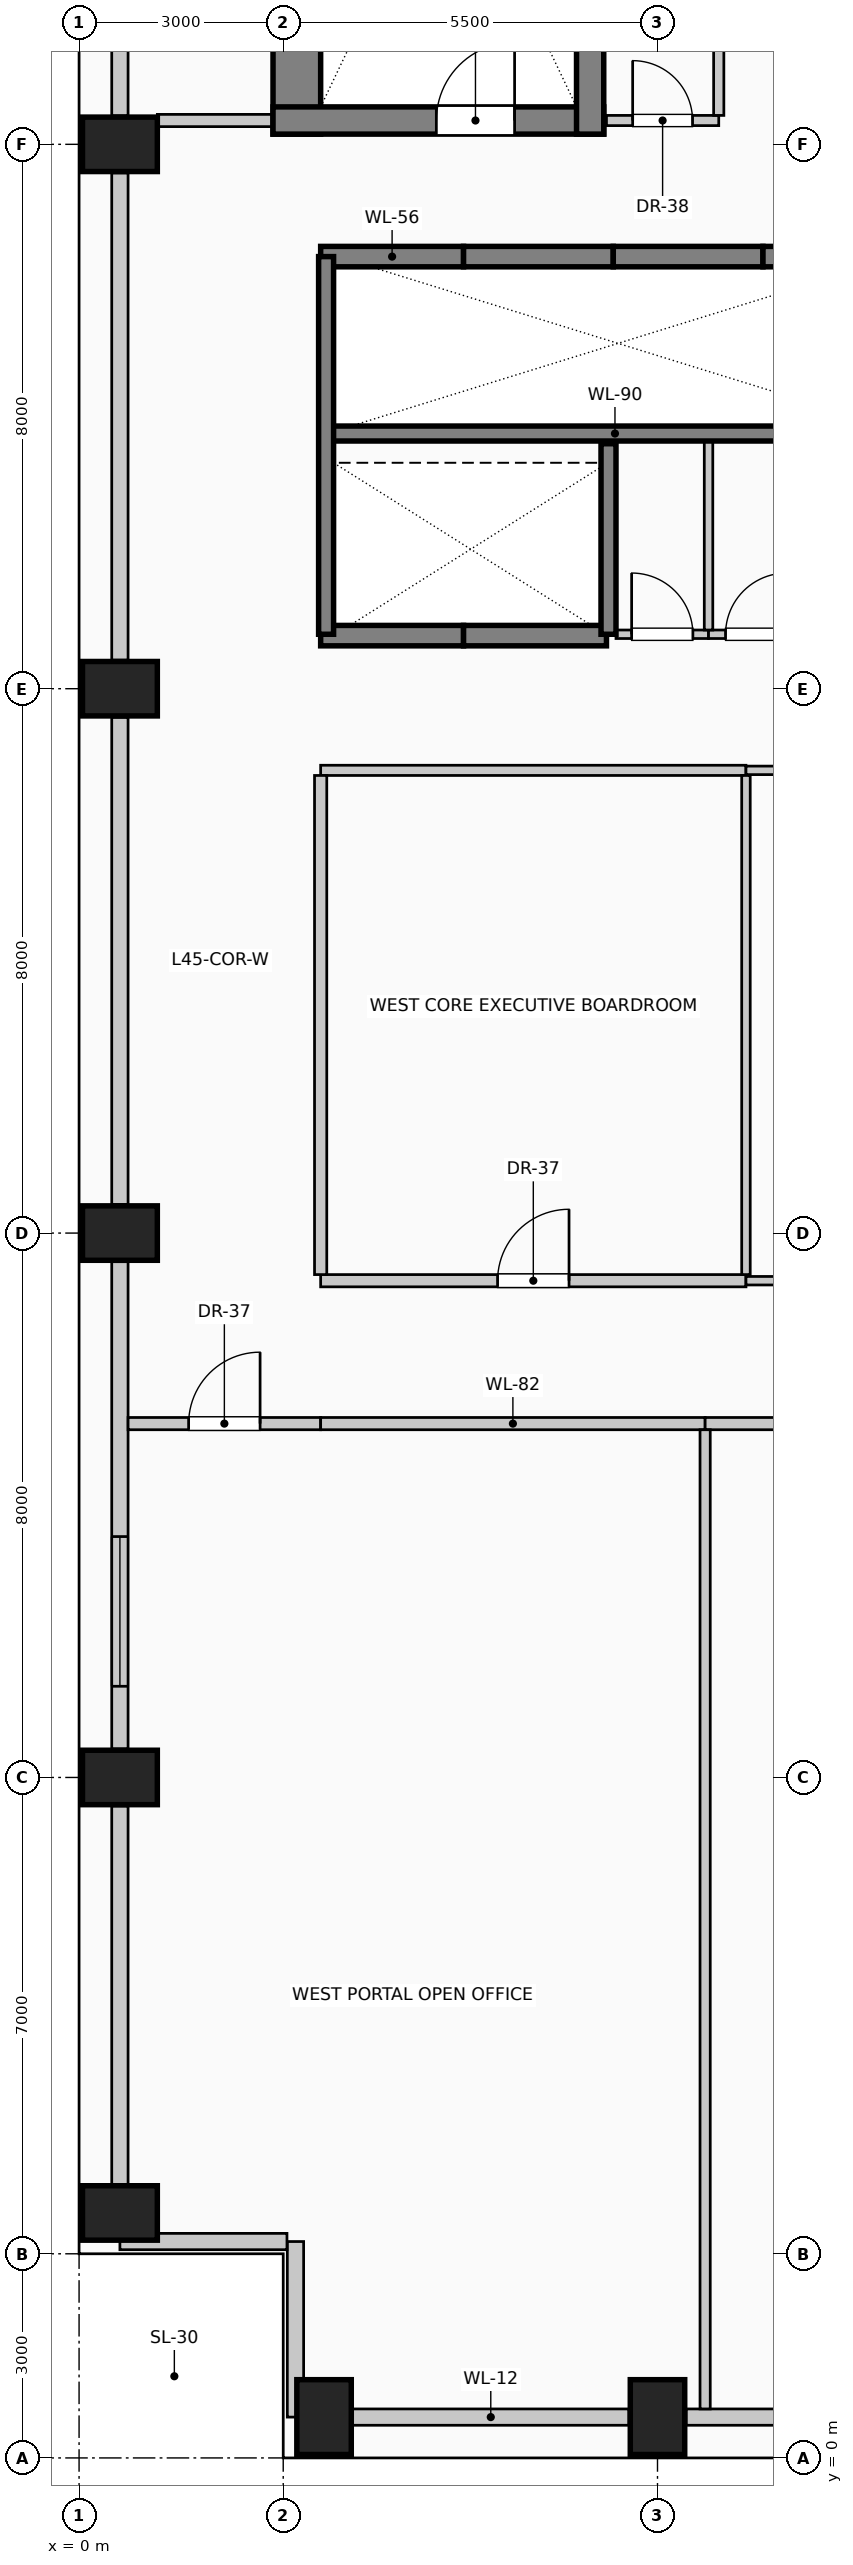
"""IFC4 building model, lengths in metres.
Left out: names, types, materials, properties, quantities, classifications, styles, units other than length and angle.
Written with IfcOpenShell. Run it as: python <this file> out.ifc"""

import sys

from ifc_helpers import new_model, si_unit, direction, frame, frame_2d, origin, origin_2d, place, context, subcontext, project, spatial, rectangle, extrude, element, fill, save


model = new_model("IFC4")
c1 = context("Model", 3, precision=1e-05, world=origin(), true_north=direction((0.0, 1.0)))
c2 = subcontext(c1, "Body", "Model", "MODEL_VIEW")
j1 = project(units=[si_unit("LENGTHUNIT", "METRE"), si_unit("PLANEANGLEUNIT", "RADIAN")], contexts=[c1])
p1 = place(None, origin())
s1 = spatial("IfcSite", under=j1, at=p1, CompositionType="ELEMENT")
p2 = place(p1, origin())
s2 = spatial("IfcBuilding", under=s1, at=p2, CompositionType="ELEMENT")
p3 = place(p2, frame((0.0, 0.0, 186.6)))
s3 = spatial("IfcBuildingStorey", under=s2, at=p3, CompositionType="ELEMENT", Elevation=186.6)
p4 = place(p3, frame((3.2, 34.15, 0.0), z_axis=(0.0, 0.0, 1.0), x_axis=(0.0, 1.0, 0.0)))
e1 = element("IfcWall", 1, at=p4, inside=s3, PredefinedType="SHEAR", context=c2, shape_type="SweptSolid", body=[
    extrude(rectangle(XDim=8.98, YDim=0.7, at=frame_2d((4.49, 0.0))), origin(), (0.0, 0.0, 1.0), 4.0),
])
p5 = place(p3, frame((2.85, 34.35, 0.0), z_axis=(0.0, 0.0, 1.0), x_axis=(1.0, 0.0, 0.0)))
e2 = element("IfcWall", 2, at=p5, inside=s3, PredefinedType="SHEAR", context=c2, shape_type="SweptSolid", body=[
    extrude(rectangle(XDim=4.86, YDim=0.4, at=frame_2d((2.43, 0.0))), origin(), (0.0, 0.0, 1.0), 4.0),
])
p6 = place(p5, frame((2.4, 0.0, 0.0)))
e3 = element("IfcOpeningElement", 3, at=p6, cuts=e2, PredefinedType="OPENING", context=c2, shape_type="SweptSolid", body=[
    extrude(rectangle(XDim=1.15, YDim=2.2, at=frame_2d((0.575, 1.1))), frame((0.0, 0.21, 0.0), z_axis=(0.0, -1.0, 0.0), x_axis=(1.0, 0.0, 0.0)), (0.0, 0.0, 1.0), 0.42),
])
p7 = place(p3, frame((7.51, 34.15, 0.0), z_axis=(0.0, 0.0, 1.0), x_axis=(0.0, 1.0, 0.0)))
e4 = element("IfcWall", 4, at=p7, inside=s3, PredefinedType="SHEAR", context=c2, shape_type="SweptSolid", body=[
    extrude(rectangle(XDim=8.98, YDim=0.4, at=frame_2d((4.49, 0.0))), origin(), (0.0, 0.0, 1.0), 4.0),
])
for number, where, z_axis, x_axis in (
    (5, (3.6, 0.6, 0.0), (0.0, 0.0, 1.0), (1.0, 0.0, 0.0)),
    (6, (8.5, 0.6, 0.0), (0.0, 0.0, 1.0), (1.0, 0.0, 0.0)),
    (7, (0.6, 3.6, 0.0), (0.0, 0.0, 1.0), (0.0, 1.0, 0.0)),
    (8, (0.6, 10.0, 0.0), (0.0, 0.0, 1.0), (0.0, 1.0, 0.0)),
    (9, (0.6, 18.0, 0.0), (0.0, 0.0, 1.0), (0.0, 1.0, 0.0)),
    (10, (0.6, 26.0, 0.0), (0.0, 0.0, 1.0), (0.0, 1.0, 0.0)),
    (11, (0.6, 34.0, 0.0), (0.0, 0.0, 1.0), (0.0, 1.0, 0.0)),
):
    element("IfcColumn", number, at=place(p3, frame(where, z_axis=z_axis, x_axis=x_axis)), inside=s3, PredefinedType="COLUMN", context=c2, shape_type="SweptSolid", body=[
        extrude(rectangle(XDim=0.8, YDim=1.1, at=origin_2d()), origin(), (0.0, 0.0, 1.0), 4.0),
    ])
p8 = place(p3, frame((8.08, 0.6, 0.0), z_axis=(0.0, 0.0, 1.0), x_axis=(-1.0, 0.0, 0.0)))
e12 = element("IfcWall", 12, at=p8, inside=s3, PredefinedType="SOLIDWALL", context=c2, shape_type="SweptSolid", body=[
    extrude(rectangle(XDim=4.06, YDim=0.24, at=frame_2d((2.03, 0.0))), origin(), (0.0, 0.0, 1.0), 3.0),
])
p9 = place(p3, frame((13.58, 0.6, 0.0), z_axis=(0.0, 0.0, 1.0), x_axis=(-1.0, 0.0, 0.0)))
e13 = element("IfcWall", 13, at=p9, inside=s3, PredefinedType="SOLIDWALL", context=c2, shape_type="SweptSolid", body=[
    extrude(rectangle(XDim=4.66, YDim=0.24, at=frame_2d((2.33, 0.0))), origin(), (0.0, 0.0, 1.0), 3.0),
])
p10 = place(p3, frame((0.6, 4.02, 0.0), z_axis=(0.0, 0.0, 1.0), x_axis=(0.0, 1.0, 0.0)))
e14 = element("IfcWall", 14, at=p10, inside=s3, PredefinedType="SOLIDWALL", context=c2, shape_type="SweptSolid", body=[
    extrude(rectangle(XDim=5.56, YDim=0.24, at=frame_2d((2.78, 0.0))), origin(), (0.0, 0.0, 1.0), 3.0),
])
p11 = place(p3, frame((0.6, 10.42, 0.0), z_axis=(0.0, 0.0, 1.0), x_axis=(0.0, 1.0, 0.0)))
e15 = element("IfcWall", 15, at=p11, inside=s3, PredefinedType="SOLIDWALL", context=c2, shape_type="SweptSolid", body=[
    extrude(rectangle(XDim=7.16, YDim=0.24, at=frame_2d((3.58, 0.0))), origin(), (0.0, 0.0, 1.0), 3.0),
])
p12 = place(p11, frame((0.92, 0.0, 0.42)))
e16 = element("IfcOpeningElement", 16, at=p12, cuts=e15, PredefinedType="OPENING", context=c2, shape_type="SweptSolid", body=[
    extrude(rectangle(XDim=2.2, YDim=1.95, at=frame_2d((1.1, 0.975))), frame((0.0, 0.13, 0.0), z_axis=(0.0, -1.0, 0.0), x_axis=(1.0, 0.0, 0.0)), (0.0, 0.0, 1.0), 0.26),
])
for number, where, z_axis, x_axis in (
    (17, (0.6, 18.42, 0.0), (0.0, 0.0, 1.0), (0.0, 1.0, 0.0)),
    (18, (0.6, 26.42, 0.0), (0.0, 0.0, 1.0), (0.0, 1.0, 0.0)),
):
    element("IfcWall", number, at=place(p3, frame(where, z_axis=z_axis, x_axis=x_axis)), inside=s3, PredefinedType="SOLIDWALL", context=c2, shape_type="SweptSolid", body=[
        extrude(rectangle(XDim=7.16, YDim=0.24, at=frame_2d((3.58, 0.0))), origin(), (0.0, 0.0, 1.0), 3.0),
    ])
p13 = place(p3, frame((0.6, 34.42, 0.0), z_axis=(0.0, 0.0, 1.0), x_axis=(0.0, 1.0, 0.0)))
e19 = element("IfcWall", 19, at=p13, inside=s3, PredefinedType="SOLIDWALL", context=c2, shape_type="SweptSolid", body=[
    extrude(rectangle(XDim=7.56, YDim=0.24, at=frame_2d((3.78, 0.0))), origin(), (0.0, 0.0, 1.0), 3.0),
])
p14 = place(p3, frame((3.18, 0.6, 0.0), z_axis=(0.0, 0.0, 1.0), x_axis=(0.0, 1.0, 0.0)))
e20 = element("IfcWall", 20, at=p14, inside=s3, PredefinedType="SOLIDWALL", context=c2, shape_type="SweptSolid", body=[
    extrude(rectangle(XDim=2.58, YDim=0.24, at=frame_2d((1.29, 0.0))), origin(), (0.0, 0.0, 1.0), 3.75),
])
p15 = place(p3, frame((3.055, 3.18, 0.0), z_axis=(0.0, 0.0, 1.0), x_axis=(-1.0, 0.0, 0.0)))
e21 = element("IfcWall", 21, at=p15, inside=s3, PredefinedType="SOLIDWALL", context=c2, shape_type="SweptSolid", body=[
    extrude(rectangle(XDim=2.455, YDim=0.24, at=frame_2d((1.228, 0.0))), origin(), (0.0, 0.0, 1.0), 3.75),
])
p16 = place(p3, frame((3.55, 32.35, 0.0), z_axis=(0.0, 0.0, 1.0), x_axis=(1.0, 0.0, 0.0)))
e22 = element("IfcWall", 22, at=p16, inside=s3, PredefinedType="SOLIDWALL", context=c2, shape_type="SweptSolid", body=[
    extrude(rectangle(XDim=2.1, YDim=0.3, at=frame_2d((1.05, 0.0))), origin(), (0.0, 0.0, 1.0), 4.0),
])
p17 = place(p3, frame((5.65, 32.35, 0.0), z_axis=(0.0, 0.0, 1.0), x_axis=(1.0, 0.0, 0.0)))
e23 = element("IfcWall", 23, at=p17, inside=s3, PredefinedType="SOLIDWALL", context=c2, shape_type="SweptSolid", body=[
    extrude(rectangle(XDim=2.2, YDim=0.3, at=frame_2d((1.1, 0.0))), origin(), (0.0, 0.0, 1.0), 4.0),
])
p18 = place(p3, frame((7.85, 32.35, 0.0), z_axis=(0.0, 0.0, 1.0), x_axis=(1.0, 0.0, 0.0)))
e24 = element("IfcWall", 24, at=p18, inside=s3, PredefinedType="SOLIDWALL", context=c2, shape_type="SweptSolid", body=[
    extrude(rectangle(XDim=2.2, YDim=0.3, at=frame_2d((1.1, 0.0))), origin(), (0.0, 0.0, 1.0), 4.0),
])
p19 = place(p3, frame((10.05, 32.35, 0.0), z_axis=(0.0, 0.0, 1.0), x_axis=(1.0, 0.0, 0.0)))
e25 = element("IfcWall", 25, at=p19, inside=s3, PredefinedType="SOLIDWALL", context=c2, shape_type="SweptSolid", body=[
    extrude(rectangle(XDim=2.15, YDim=0.3, at=frame_2d((1.075, 0.0))), origin(), (0.0, 0.0, 1.0), 4.0),
])
p20 = place(p3, frame((5.65, 26.78, 0.0), z_axis=(0.0, 0.0, 1.0), x_axis=(-1.0, 0.0, 0.0)))
e26 = element("IfcWall", 26, at=p20, inside=s3, PredefinedType="SOLIDWALL", context=c2, shape_type="SweptSolid", body=[
    extrude(rectangle(XDim=2.1, YDim=0.3, at=frame_2d((1.05, 0.0))), origin(), (0.0, 0.0, 1.0), 4.0),
])
p21 = place(p3, frame((7.75, 26.78, 0.0), z_axis=(0.0, 0.0, 1.0), x_axis=(-1.0, 0.0, 0.0)))
e27 = element("IfcWall", 27, at=p21, inside=s3, PredefinedType="SOLIDWALL", context=c2, shape_type="SweptSolid", body=[
    extrude(rectangle(XDim=2.1, YDim=0.3, at=frame_2d((1.05, 0.0))), origin(), (0.0, 0.0, 1.0), 4.0),
])
p22 = place(p3, frame((3.55, 29.75, 0.0), z_axis=(0.0, 0.0, 1.0), x_axis=(1.0, 0.0, 0.0)))
e28 = element("IfcWall", 28, at=p22, inside=s3, PredefinedType="SOLIDWALL", context=c2, shape_type="SweptSolid", body=[
    extrude(rectangle(XDim=8.65, YDim=0.22, at=frame_2d((4.325, 0.0))), origin(), (0.0, 0.0, 1.0), 4.0),
])
p23 = place(p3, frame((3.63, 26.8, 0.0), z_axis=(0.0, 0.0, 1.0), x_axis=(0.0, 1.0, 0.0)))
e29 = element("IfcWall", 29, at=p23, inside=s3, PredefinedType="SOLIDWALL", context=c2, shape_type="SweptSolid", body=[
    extrude(rectangle(XDim=5.55, YDim=0.22, at=frame_2d((2.775, 0.0))), origin(), (0.0, 0.0, 1.0), 4.0),
])
p24 = place(p3, frame((7.78, 26.8, 0.0), z_axis=(0.0, 0.0, 1.0), x_axis=(0.0, 1.0, 0.0)))
e30 = element("IfcWall", 30, at=p24, inside=s3, PredefinedType="SOLIDWALL", context=c2, shape_type="SweptSolid", body=[
    extrude(rectangle(XDim=2.8, YDim=0.22, at=frame_2d((1.4, 0.0))), origin(), (0.0, 0.0, 1.0), 4.0),
])
p25 = place(p3, frame((0.72, 15.2, 0.0), z_axis=(0.0, 0.0, 1.0), x_axis=(1.0, 0.0, 0.0)))
e31 = element("IfcWall", 31, at=p25, inside=s3, PredefinedType="PARTITIONING", context=c2, shape_type="SweptSolid", body=[
    extrude(rectangle(XDim=2.83, YDim=0.18, at=frame_2d((1.415, 0.0))), origin(), (0.0, 0.0, 1.0), 3.75),
])
p26 = place(p25, frame((0.89, 0.0, 0.0)))
e32 = element("IfcOpeningElement", 32, at=p26, cuts=e31, PredefinedType="OPENING", context=c2, shape_type="SweptSolid", body=[
    extrude(rectangle(XDim=1.05, YDim=2.15, at=frame_2d((0.525, 1.075))), frame((0.0, 0.1, 0.0), z_axis=(0.0, -1.0, 0.0), x_axis=(1.0, 0.0, 0.0)), (0.0, 0.0, 1.0), 0.2),
])
p27 = place(p3, frame((3.55, 15.2, 0.0), z_axis=(0.0, 0.0, 1.0), x_axis=(1.0, 0.0, 0.0)))
e33 = element("IfcWall", 33, at=p27, inside=s3, PredefinedType="PARTITIONING", context=c2, shape_type="SweptSolid", body=[
    extrude(rectangle(XDim=5.65, YDim=0.18, at=frame_2d((2.825, 0.0))), origin(), (0.0, 0.0, 1.0), 3.75),
])
p28 = place(p3, frame((9.2, 15.2, 0.0), z_axis=(0.0, 0.0, 1.0), x_axis=(1.0, 0.0, 0.0)))
e34 = element("IfcWall", 34, at=p28, inside=s3, PredefinedType="PARTITIONING", context=c2, shape_type="SweptSolid", body=[
    extrude(rectangle(XDim=14.68, YDim=0.18, at=frame_2d((7.34, 0.0))), origin(), (0.0, 0.0, 1.0), 3.75),
])
p29 = place(p28, frame((6.815, 0.0, 0.0)))
e35 = element("IfcOpeningElement", 35, at=p29, cuts=e34, PredefinedType="OPENING", context=c2, shape_type="SweptSolid", body=[
    extrude(rectangle(XDim=1.05, YDim=2.15, at=frame_2d((0.525, 1.075))), frame((0.0, 0.1, 0.0), z_axis=(0.0, -1.0, 0.0), x_axis=(1.0, 0.0, 0.0)), (0.0, 0.0, 1.0), 0.2),
])
p30 = place(p3, frame((3.55, 17.3, 0.0), z_axis=(0.0, 0.0, 1.0), x_axis=(1.0, 0.0, 0.0)))
e36 = element("IfcWall", 36, at=p30, inside=s3, PredefinedType="PARTITIONING", context=c2, shape_type="SweptSolid", body=[
    extrude(rectangle(XDim=6.25, YDim=0.18, at=frame_2d((3.125, 0.0))), origin(), (0.0, 0.0, 1.0), 3.75),
])
p31 = place(p30, frame((2.6, 0.0, 0.0)))
e37 = element("IfcOpeningElement", 37, at=p31, cuts=e36, PredefinedType="OPENING", context=c2, shape_type="SweptSolid", body=[
    extrude(rectangle(XDim=1.05, YDim=2.15, at=frame_2d((0.525, 1.075))), frame((0.0, 0.1, 0.0), z_axis=(0.0, -1.0, 0.0), x_axis=(1.0, 0.0, 0.0)), (0.0, 0.0, 1.0), 0.2),
])
p32 = place(p3, frame((9.8, 17.3, 0.0), z_axis=(0.0, 0.0, 1.0), x_axis=(1.0, 0.0, 0.0)))
e38 = element("IfcWall", 38, at=p32, inside=s3, PredefinedType="PARTITIONING", context=c2, shape_type="SweptSolid", body=[
    extrude(rectangle(XDim=6.05, YDim=0.125, at=frame_2d((3.025, 0.0))), origin(), (0.0, 0.0, 1.0), 3.75),
])
p33 = place(p32, frame((2.575, 0.0, 0.0)))
e39 = element("IfcOpeningElement", 39, at=p33, cuts=e38, PredefinedType="OPENING", context=c2, shape_type="SweptSolid", body=[
    extrude(rectangle(XDim=0.9, YDim=2.1, at=frame_2d((0.45, 1.05))), frame((0.0, 0.073, 0.0), z_axis=(0.0, -1.0, 0.0), x_axis=(1.0, 0.0, 0.0)), (0.0, 0.0, 1.0), 0.145),
])
p34 = place(p3, frame((3.55, 24.8, 0.0), z_axis=(0.0, 0.0, 1.0), x_axis=(1.0, 0.0, 0.0)))
e40 = element("IfcWall", 40, at=p34, inside=s3, PredefinedType="PARTITIONING", context=c2, shape_type="SweptSolid", body=[
    extrude(rectangle(XDim=6.25, YDim=0.15, at=frame_2d((3.125, 0.0))), origin(), (0.0, 0.0, 1.0), 3.75),
])
p35 = place(p3, frame((9.8, 24.8, 0.0), z_axis=(0.0, 0.0, 1.0), x_axis=(1.0, 0.0, 0.0)))
e41 = element("IfcWall", 41, at=p35, inside=s3, PredefinedType="PARTITIONING", context=c2, shape_type="SweptSolid", body=[
    extrude(rectangle(XDim=2.4, YDim=0.125, at=frame_2d((1.2, 0.0))), origin(), (0.0, 0.0, 1.0), 3.75),
])
p36 = place(p3, frame((7.89, 26.8, 0.0), z_axis=(0.0, 0.0, 1.0), x_axis=(1.0, 0.0, 0.0)))
e42 = element("IfcWall", 42, at=p36, inside=s3, PredefinedType="PARTITIONING", context=c2, shape_type="SweptSolid", body=[
    extrude(rectangle(XDim=1.36, YDim=0.125, at=frame_2d((0.68, 0.0))), origin(), (0.0, 0.0, 1.0), 3.75),
])
p37 = place(p36, frame((0.23, 0.0, 0.0)))
e43 = element("IfcOpeningElement", 43, at=p37, cuts=e42, PredefinedType="OPENING", context=c2, shape_type="SweptSolid", body=[
    extrude(rectangle(XDim=0.9, YDim=2.1, at=frame_2d((0.45, 1.05))), frame((0.0, 0.073, 0.0), z_axis=(0.0, -1.0, 0.0), x_axis=(1.0, 0.0, 0.0)), (0.0, 0.0, 1.0), 0.145),
])
p38 = place(p3, frame((9.25, 26.8, 0.0), z_axis=(0.0, 0.0, 1.0), x_axis=(1.0, 0.0, 0.0)))
e44 = element("IfcWall", 44, at=p38, inside=s3, PredefinedType="PARTITIONING", context=c2, shape_type="SweptSolid", body=[
    extrude(rectangle(XDim=1.4, YDim=0.125, at=frame_2d((0.7, 0.0))), origin(), (0.0, 0.0, 1.0), 3.75),
])
p39 = place(p38, frame((0.25, 0.0, 0.0)))
e45 = element("IfcOpeningElement", 45, at=p39, cuts=e44, PredefinedType="OPENING", context=c2, shape_type="SweptSolid", body=[
    extrude(rectangle(XDim=0.9, YDim=2.1, at=frame_2d((0.45, 1.05))), frame((0.0, 0.073, 0.0), z_axis=(0.0, -1.0, 0.0), x_axis=(1.0, 0.0, 0.0)), (0.0, 0.0, 1.0), 0.145),
])
p40 = place(p3, frame((1.15, 34.35, 0.0), z_axis=(0.0, 0.0, 1.0), x_axis=(1.0, 0.0, 0.0)))
e46 = element("IfcWall", 46, at=p40, inside=s3, PredefinedType="PARTITIONING", context=c2, shape_type="SweptSolid", body=[
    extrude(rectangle(XDim=1.7, YDim=0.18, at=frame_2d((0.85, 0.0))), origin(), (0.0, 0.0, 1.0), 3.75),
])
p41 = place(p3, frame((7.75, 34.35, 0.0), z_axis=(0.0, 0.0, 1.0), x_axis=(1.0, 0.0, 0.0)))
e47 = element("IfcWall", 47, at=p41, inside=s3, PredefinedType="PARTITIONING", context=c2, shape_type="SweptSolid", body=[
    extrude(rectangle(XDim=1.65, YDim=0.15, at=frame_2d((0.825, 0.0))), origin(), (0.0, 0.0, 1.0), 3.75),
])
p42 = place(p41, frame((0.385, 0.0, 0.0)))
e48 = element("IfcOpeningElement", 48, at=p42, cuts=e47, PredefinedType="OPENING", context=c2, shape_type="SweptSolid", body=[
    extrude(rectangle(XDim=0.88, YDim=2.1, at=frame_2d((0.44, 1.05))), frame((0.0, 0.085, 0.0), z_axis=(0.0, -1.0, 0.0), x_axis=(1.0, 0.0, 0.0)), (0.0, 0.0, 1.0), 0.17),
])
p43 = place(p3, frame((3.55, 17.39, 0.0), z_axis=(0.0, 0.0, 1.0), x_axis=(0.0, 1.0, 0.0)))
e49 = element("IfcWall", 49, at=p43, inside=s3, PredefinedType="PARTITIONING", context=c2, shape_type="SweptSolid", body=[
    extrude(rectangle(XDim=7.335, YDim=0.18, at=frame_2d((3.667, 0.0))), origin(), (0.0, 0.0, 1.0), 3.75),
])
p44 = place(p3, frame((9.2, 0.72, 0.0), z_axis=(0.0, 0.0, 1.0), x_axis=(0.0, 1.0, 0.0)))
e50 = element("IfcWall", 50, at=p44, inside=s3, PredefinedType="PARTITIONING", context=c2, shape_type="SweptSolid", body=[
    extrude(rectangle(XDim=14.39, YDim=0.15, at=frame_2d((7.195, 0.0))), origin(), (0.0, 0.0, 1.0), 3.75),
])
p45 = place(p3, frame((9.25, 26.863, 0.0), z_axis=(0.0, 0.0, 1.0), x_axis=(0.0, 1.0, 0.0)))
e51 = element("IfcWall", 51, at=p45, inside=s3, PredefinedType="PARTITIONING", context=c2, shape_type="SweptSolid", body=[
    extrude(rectangle(XDim=2.777, YDim=0.125, at=frame_2d((1.389, 0.0))), origin(), (0.0, 0.0, 1.0), 3.75),
])
p46 = place(p3, frame((9.4, 34.425, 0.0), z_axis=(0.0, 0.0, 1.0), x_axis=(0.0, 1.0, 0.0)))
e52 = element("IfcWall", 52, at=p46, inside=s3, PredefinedType="PARTITIONING", context=c2, shape_type="SweptSolid", body=[
    extrude(rectangle(XDim=2.065, YDim=0.15, at=frame_2d((1.032, 0.0))), origin(), (0.0, 0.0, 1.0), 3.75),
])
p47 = place(p3, frame((9.8, 17.39, 0.0), z_axis=(0.0, 0.0, 1.0), x_axis=(0.0, 1.0, 0.0)))
e53 = element("IfcWall", 53, at=p47, inside=s3, PredefinedType="PARTITIONING", context=c2, shape_type="SweptSolid", body=[
    extrude(rectangle(XDim=7.335, YDim=0.125, at=frame_2d((3.667, 0.0))), origin(), (0.0, 0.0, 1.0), 3.75),
])
p48 = place(p12, origin())
e54 = element("IfcWindow", 54, at=p48, inside=s3, PartitioningType="SINGLE_PANEL", PredefinedType="WINDOW", context=c2, shape_type="SweptSolid", body=[
    extrude(rectangle(XDim=2.2, YDim=1.95, at=frame_2d((1.1, 0.975))), frame((0.0, 0.03, 0.0), z_axis=(0.0, -1.0, 0.0), x_axis=(1.0, 0.0, 0.0)), (0.0, 0.0, 1.0), 0.06),
])
fill(e16, e54)
p49 = place(p6, origin())
e55 = element("IfcDoor", 55, at=p49, inside=s3, OperationType="SINGLE_SWING_RIGHT", PredefinedType="DOOR", context=c2, shape_type="SweptSolid", body=[
    extrude(rectangle(XDim=1.15, YDim=2.2, at=frame_2d((0.575, 1.1))), frame((0.0, 0.025, 0.0), z_axis=(0.0, -1.0, 0.0), x_axis=(1.0, 0.0, 0.0)), (0.0, 0.0, 1.0), 0.05),
])
fill(e3, e55)
p50 = place(p26, origin())
e56 = element("IfcDoor", 56, at=p50, inside=s3, OperationType="SINGLE_SWING_RIGHT", PredefinedType="DOOR", context=c2, shape_type="SweptSolid", body=[
    extrude(rectangle(XDim=1.05, YDim=2.15, at=frame_2d((0.525, 1.075))), frame((0.0, 0.025, 0.0), z_axis=(0.0, -1.0, 0.0), x_axis=(1.0, 0.0, 0.0)), (0.0, 0.0, 1.0), 0.05),
])
fill(e32, e56)
p51 = place(p31, origin())
e57 = element("IfcDoor", 57, at=p51, inside=s3, OperationType="SINGLE_SWING_RIGHT", PredefinedType="DOOR", context=c2, shape_type="SweptSolid", body=[
    extrude(rectangle(XDim=1.05, YDim=2.15, at=frame_2d((0.525, 1.075))), frame((0.0, 0.025, 0.0), z_axis=(0.0, -1.0, 0.0), x_axis=(1.0, 0.0, 0.0)), (0.0, 0.0, 1.0), 0.05),
])
fill(e37, e57)
p52 = place(p37, origin())
e58 = element("IfcDoor", 58, at=p52, inside=s3, OperationType="SINGLE_SWING_LEFT", PredefinedType="DOOR", context=c2, shape_type="SweptSolid", body=[
    extrude(rectangle(XDim=0.9, YDim=2.1, at=frame_2d((0.45, 1.05))), frame((0.0, 0.025, 0.0), z_axis=(0.0, -1.0, 0.0), x_axis=(1.0, 0.0, 0.0)), (0.0, 0.0, 1.0), 0.05),
])
fill(e43, e58)
p53 = place(p39, origin())
e59 = element("IfcDoor", 59, at=p53, inside=s3, OperationType="SINGLE_SWING_RIGHT", PredefinedType="DOOR", context=c2, shape_type="SweptSolid", body=[
    extrude(rectangle(XDim=0.9, YDim=2.1, at=frame_2d((0.45, 1.05))), frame((0.0, 0.025, 0.0), z_axis=(0.0, -1.0, 0.0), x_axis=(1.0, 0.0, 0.0)), (0.0, 0.0, 1.0), 0.05),
])
fill(e45, e59)
p54 = place(p42, origin())
e60 = element("IfcDoor", 60, at=p54, inside=s3, OperationType="SINGLE_SWING_LEFT", PredefinedType="DOOR", context=c2, shape_type="SweptSolid", body=[
    extrude(rectangle(XDim=0.88, YDim=2.1, at=frame_2d((0.44, 1.05))), frame((0.0, 0.025, 0.0), z_axis=(0.0, -1.0, 0.0), x_axis=(1.0, 0.0, 0.0)), (0.0, 0.0, 1.0), 0.05),
])
fill(e48, e60)
save(model, sys.argv[1])
